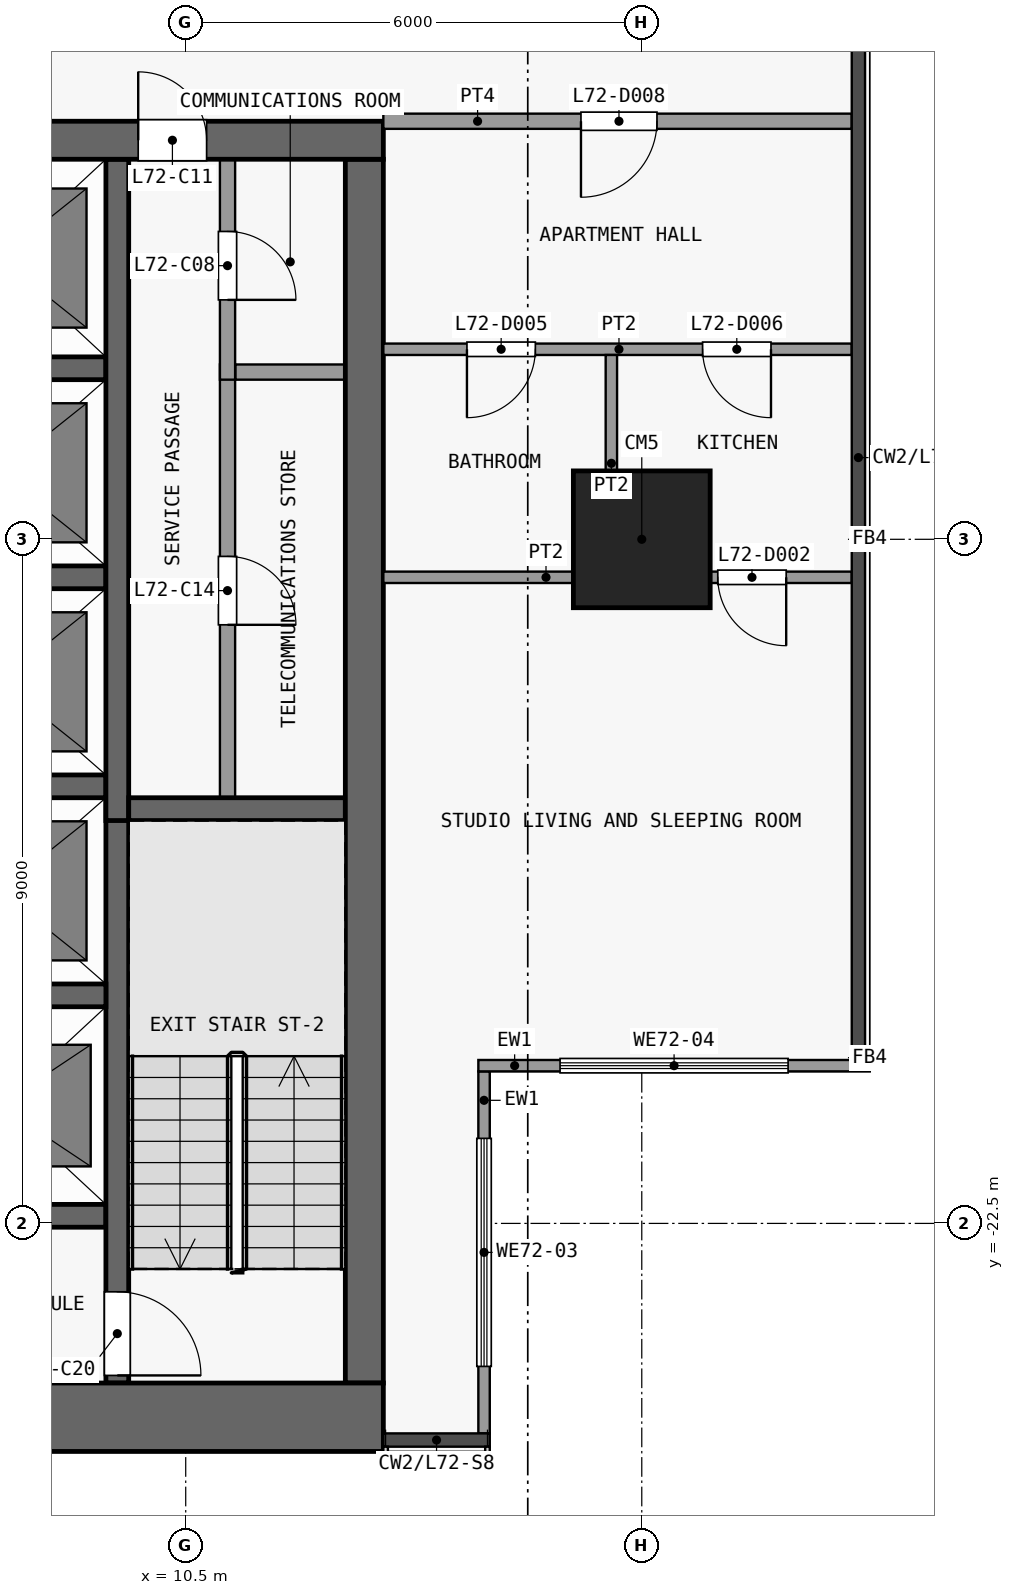
"""IFC4 building model, lengths in metres.
Left out: names, types, materials, properties, quantities, classifications, styles, units other than length and angle.
Written with IfcOpenShell. Run it as: python <this file> out.ifc"""

import sys

from ifc_helpers import new_model, si_unit, direction, frame, frame_2d, origin, origin_2d, place, context, subcontext, project, spatial, rectangle, extrude, element, fill, save


model = new_model("IFC4")
c1 = context("Model", 3, precision=1e-05, world=origin(), true_north=direction((0.0, 1.0)))
c2 = subcontext(c1, "Body", "Model", "MODEL_VIEW")
j1 = project(units=[si_unit("LENGTHUNIT", "METRE"), si_unit("PLANEANGLEUNIT", "RADIAN")], contexts=[c1])
p1 = place(None, origin())
s1 = spatial("IfcSite", under=j1, at=p1, CompositionType="ELEMENT")
p2 = place(p1, origin())
s2 = spatial("IfcBuilding", under=s1, at=p2, CompositionType="ELEMENT")
p3 = place(p2, frame((0.0, 0.0, 284.3)))
s3 = spatial("IfcBuildingStorey", under=s2, at=p3, CompositionType="ELEMENT", Elevation=284.3)
p4 = place(p3, frame((16.5, -13.5, 0.0), z_axis=(0.0, 0.0, 1.0), x_axis=(1.0, 0.0, 0.0)))
e1 = element("IfcColumn", 1, at=p4, inside=s3, PredefinedType="COLUMN", context=c2, shape_type="SweptSolid", body=[
    extrude(rectangle(XDim=1.8, YDim=1.8, at=origin_2d()), origin(), (0.0, 0.0, 1.0), 3.6),
])
p5 = place(p3, frame((-13.1, -25.05, 0.0), z_axis=(0.0, 0.0, 1.0), x_axis=(1.0, 0.0, 0.0)))
e2 = element("IfcWall", 2, at=p5, inside=s3, PredefinedType="SHEAR", context=c2, shape_type="SweptSolid", body=[
    extrude(rectangle(XDim=26.2, YDim=0.9, at=frame_2d((13.1, 0.0))), origin(), (0.0, 0.0, 1.0), 3.3),
])
p6 = place(p3, frame((-13.1, -8.25, 0.0), z_axis=(0.0, 0.0, 1.0), x_axis=(1.0, 0.0, 0.0)))
e3 = element("IfcWall", 3, at=p6, inside=s3, PredefinedType="SHEAR", context=c2, shape_type="SweptSolid", body=[
    extrude(rectangle(XDim=26.2, YDim=0.5, at=frame_2d((13.1, 0.0))), origin(), (0.0, 0.0, 1.0), 3.3),
])
p7 = place(p6, frame((7.4, 0.0, 0.0)))
e4 = element("IfcOpeningElement", 4, at=p7, cuts=e3, PredefinedType="OPENING", context=c2, shape_type="SweptSolid", body=[
    extrude(rectangle(XDim=1.8, YDim=2.1, at=frame_2d((0.9, 1.05))), frame((0.0, 0.26, 0.0), z_axis=(0.0, -1.0, 0.0), x_axis=(1.0, 0.0, 0.0)), (0.0, 0.0, 1.0), 0.52),
])
p8 = place(p6, frame((17.0, 0.0, 0.0)))
e5 = element("IfcOpeningElement", 5, at=p8, cuts=e3, PredefinedType="OPENING", context=c2, shape_type="SweptSolid", body=[
    extrude(rectangle(XDim=1.8, YDim=2.1, at=frame_2d((0.9, 1.05))), frame((0.0, 0.26, 0.0), z_axis=(0.0, -1.0, 0.0), x_axis=(1.0, 0.0, 0.0)), (0.0, 0.0, 1.0), 0.52),
])
p9 = place(p6, frame((2.325, 0.0, 0.0)))
e6 = element("IfcOpeningElement", 6, at=p9, cuts=e3, PredefinedType="OPENING", context=c2, shape_type="SweptSolid", body=[
    extrude(rectangle(XDim=0.9, YDim=2.1, at=frame_2d((0.45, 1.05))), frame((0.0, 0.26, 0.0), z_axis=(0.0, -1.0, 0.0), x_axis=(1.0, 0.0, 0.0)), (0.0, 0.0, 1.0), 0.52),
])
p10 = place(p6, frame((22.975, 0.0, 0.0)))
e7 = element("IfcOpeningElement", 7, at=p10, cuts=e3, PredefinedType="OPENING", context=c2, shape_type="SweptSolid", body=[
    extrude(rectangle(XDim=0.9, YDim=2.1, at=frame_2d((0.45, 1.05))), frame((0.0, 0.26, 0.0), z_axis=(0.0, -1.0, 0.0), x_axis=(1.0, 0.0, 0.0)), (0.0, 0.0, 1.0), 0.52),
])
p11 = place(p3, frame((12.85, -24.6, 0.0), z_axis=(0.0, 0.0, 1.0), x_axis=(0.0, 1.0, 0.0)))
e8 = element("IfcWall", 8, at=p11, inside=s3, PredefinedType="SHEAR", context=c2, shape_type="SweptSolid", body=[
    extrude(rectangle(XDim=16.1, YDim=0.5, at=frame_2d((8.05, 0.0))), origin(), (0.0, 0.0, 1.0), 3.3),
])
for number, where, z_axis, x_axis in (
    (9, (6.65, -22.4, 0.0), (0.0, 0.0, 1.0), (1.0, 0.0, 0.0)),
    (10, (6.65, -19.5, 0.0), (0.0, 0.0, 1.0), (1.0, 0.0, 0.0)),
):
    element("IfcWall", number, at=place(p3, frame(where, z_axis=z_axis, x_axis=x_axis)), inside=s3, PredefinedType="SHEAR", context=c2, shape_type="SweptSolid", body=[
        extrude(rectangle(XDim=2.8, YDim=0.3, at=frame_2d((1.4, 0.0))), origin(), (0.0, 0.0, 1.0), 3.3),
    ])
p12 = place(p3, frame((9.75, -17.05, 0.0), z_axis=(0.0, 0.0, 1.0), x_axis=(1.0, 0.0, 0.0)))
e11 = element("IfcWall", 11, at=p12, inside=s3, PredefinedType="SHEAR", context=c2, shape_type="SweptSolid", body=[
    extrude(rectangle(XDim=2.85, YDim=0.3, at=frame_2d((1.425, 0.0))), origin(), (0.0, 0.0, 1.0), 3.3),
])
for number, where, z_axis, x_axis in (
    (12, (6.65, -16.75, 0.0), (0.0, 0.0, 1.0), (1.0, 0.0, 0.0)),
    (13, (6.65, -14.0, 0.0), (0.0, 0.0, 1.0), (1.0, 0.0, 0.0)),
):
    element("IfcWall", number, at=place(p3, frame(where, z_axis=z_axis, x_axis=x_axis)), inside=s3, PredefinedType="SHEAR", context=c2, shape_type="SweptSolid", body=[
        extrude(rectangle(XDim=2.8, YDim=0.3, at=frame_2d((1.4, 0.0))), origin(), (0.0, 0.0, 1.0), 3.3),
    ])
p13 = place(p3, frame((11.15, -11.3, 0.0), z_axis=(0.0, 0.0, 1.0), x_axis=(1.0, 0.0, 0.0)))
e14 = element("IfcWall", 14, at=p13, inside=s3, PredefinedType="PARTITIONING", context=c2, shape_type="SweptSolid", body=[
    extrude(rectangle(XDim=1.45, YDim=0.2, at=frame_2d((0.725, 0.0))), origin(), (0.0, 0.0, 1.0), 3.3),
])
p14 = place(p3, frame((6.65, -11.25, 0.0), z_axis=(0.0, 0.0, 1.0), x_axis=(1.0, 0.0, 0.0)))
e15 = element("IfcWall", 15, at=p14, inside=s3, PredefinedType="SHEAR", context=c2, shape_type="SweptSolid", body=[
    extrude(rectangle(XDim=2.8, YDim=0.3, at=frame_2d((1.4, 0.0))), origin(), (0.0, 0.0, 1.0), 3.3),
])
p15 = place(p3, frame((9.6, -16.9, 0.0), z_axis=(0.0, 0.0, 1.0), x_axis=(0.0, -1.0, 0.0)))
e16 = element("IfcWall", 16, at=p15, inside=s3, PredefinedType="SHEAR", context=c2, shape_type="SweptSolid", body=[
    extrude(rectangle(XDim=7.7, YDim=0.3, at=frame_2d((3.85, 0.0))), origin(), (0.0, 0.0, 1.0), 3.3),
])
p16 = place(p15, frame((6.5, 0.0, 0.0)))
e17 = element("IfcOpeningElement", 17, at=p16, cuts=e16, PredefinedType="OPENING", context=c2, shape_type="SweptSolid", body=[
    extrude(rectangle(XDim=1.1, YDim=2.1, at=frame_2d((0.55, 1.05))), frame((0.0, 0.16, 0.0), z_axis=(0.0, -1.0, 0.0), x_axis=(1.0, 0.0, 0.0)), (0.0, 0.0, 1.0), 0.32),
])
p17 = place(p3, frame((9.6, -17.2, 0.0), z_axis=(0.0, 0.0, 1.0), x_axis=(0.0, 1.0, 0.0)))
e18 = element("IfcWall", 18, at=p17, inside=s3, PredefinedType="SHEAR", context=c2, shape_type="SweptSolid", body=[
    extrude(rectangle(XDim=8.7, YDim=0.3, at=frame_2d((4.35, 0.0))), origin(), (0.0, 0.0, 1.0), 3.3),
])
p18 = place(p3, frame((11.05, -11.2, 0.0), z_axis=(0.0, 0.0, 1.0), x_axis=(0.0, -1.0, 0.0)))
e19 = element("IfcWall", 19, at=p18, inside=s3, PredefinedType="PARTITIONING", context=c2, shape_type="SweptSolid", body=[
    extrude(rectangle(XDim=5.7, YDim=0.2, at=frame_2d((2.85, 0.0))), origin(), (0.0, 0.0, 1.0), 3.3),
])
p19 = place(p18, frame((2.525, 0.0, 0.0)))
e20 = element("IfcOpeningElement", 20, at=p19, cuts=e19, PredefinedType="OPENING", context=c2, shape_type="SweptSolid", body=[
    extrude(rectangle(XDim=0.9, YDim=2.1, at=frame_2d((0.45, 1.05))), frame((0.0, 0.11, 0.0), z_axis=(0.0, -1.0, 0.0), x_axis=(1.0, 0.0, 0.0)), (0.0, 0.0, 1.0), 0.22),
])
p20 = place(p3, frame((11.05, -8.5, 0.0), z_axis=(0.0, 0.0, 1.0), x_axis=(0.0, -1.0, 0.0)))
e21 = element("IfcWall", 21, at=p20, inside=s3, PredefinedType="PARTITIONING", context=c2, shape_type="SweptSolid", body=[
    extrude(rectangle(XDim=2.9, YDim=0.2, at=frame_2d((1.45, 0.0))), origin(), (0.0, 0.0, 1.0), 3.3),
])
p21 = place(p20, frame((0.95, 0.0, 0.0)))
e22 = element("IfcOpeningElement", 22, at=p21, cuts=e21, PredefinedType="OPENING", context=c2, shape_type="SweptSolid", body=[
    extrude(rectangle(XDim=0.9, YDim=2.1, at=frame_2d((0.45, 1.05))), frame((0.0, 0.11, 0.0), z_axis=(0.0, -1.0, 0.0), x_axis=(1.0, 0.0, 0.0)), (0.0, 0.0, 1.0), 0.22),
])
p22 = place(p3, frame((14.425, -20.5, 0.0), z_axis=(0.0, 0.0, 1.0), x_axis=(0.0, -1.0, 0.0)))
e23 = element("IfcWall", 23, at=p22, inside=s3, PredefinedType="SOLIDWALL", context=c2, shape_type="SweptSolid", body=[
    extrude(rectangle(XDim=4.762, YDim=0.15, at=frame_2d((2.381, 0.0))), origin(), (0.0, 0.0, 1.0), 3.3),
])
p23 = place(p22, frame((0.881, 0.0, 0.9)))
e24 = element("IfcOpeningElement", 24, at=p23, cuts=e23, PredefinedType="OPENING", context=c2, shape_type="SweptSolid", body=[
    extrude(rectangle(XDim=3.0, YDim=2.4, at=frame_2d((1.5, 1.2))), frame((0.0, 0.085, 0.0), z_axis=(0.0, -1.0, 0.0), x_axis=(1.0, 0.0, 0.0)), (0.0, 0.0, 1.0), 0.17),
])
p24 = place(p3, frame((19.5, -20.425, 0.0), z_axis=(0.0, 0.0, 1.0), x_axis=(-1.0, 0.0, 0.0)))
e25 = element("IfcWall", 25, at=p24, inside=s3, PredefinedType="SOLIDWALL", context=c2, shape_type="SweptSolid", body=[
    extrude(rectangle(XDim=5.15, YDim=0.15, at=frame_2d((2.575, 0.0))), origin(), (0.0, 0.0, 1.0), 3.3),
])
p25 = place(p24, frame((1.075, 0.0, 0.9)))
e26 = element("IfcOpeningElement", 26, at=p25, cuts=e25, PredefinedType="OPENING", context=c2, shape_type="SweptSolid", body=[
    extrude(rectangle(XDim=3.0, YDim=2.4, at=frame_2d((1.5, 1.2))), frame((0.0, 0.085, 0.0), z_axis=(0.0, -1.0, 0.0), x_axis=(1.0, 0.0, 0.0)), (0.0, 0.0, 1.0), 0.17),
])
p26 = place(p3, frame((13.1, -14.0, 0.0), z_axis=(0.0, 0.0, 1.0), x_axis=(1.0, 0.0, 0.0)))
e27 = element("IfcWall", 27, at=p26, inside=s3, PredefinedType="PARTITIONING", context=c2, shape_type="SweptSolid", body=[
    extrude(rectangle(XDim=6.162, YDim=0.15, at=frame_2d((3.081, 0.0))), origin(), (0.0, 0.0, 1.0), 3.3),
])
p27 = place(p26, frame((4.4, 0.0, 0.0)))
e28 = element("IfcOpeningElement", 28, at=p27, cuts=e27, PredefinedType="OPENING", context=c2, shape_type="SweptSolid", body=[
    extrude(rectangle(XDim=0.9, YDim=2.1, at=frame_2d((0.45, 1.05))), frame((0.0, 0.085, 0.0), z_axis=(0.0, -1.0, 0.0), x_axis=(1.0, 0.0, 0.0)), (0.0, 0.0, 1.0), 0.17),
])
p28 = place(p3, frame((13.1, -11.0, 0.0), z_axis=(0.0, 0.0, 1.0), x_axis=(1.0, 0.0, 0.0)))
e29 = element("IfcWall", 29, at=p28, inside=s3, PredefinedType="PARTITIONING", context=c2, shape_type="SweptSolid", body=[
    extrude(rectangle(XDim=6.162, YDim=0.15, at=frame_2d((3.081, 0.0))), origin(), (0.0, 0.0, 1.0), 3.3),
])
p29 = place(p28, frame((1.1, 0.0, 0.0)))
e30 = element("IfcOpeningElement", 30, at=p29, cuts=e29, PredefinedType="OPENING", context=c2, shape_type="SweptSolid", body=[
    extrude(rectangle(XDim=0.9, YDim=2.1, at=frame_2d((0.45, 1.05))), frame((0.0, 0.085, 0.0), z_axis=(0.0, -1.0, 0.0), x_axis=(1.0, 0.0, 0.0)), (0.0, 0.0, 1.0), 0.17),
])
p30 = place(p28, frame((4.2, 0.0, 0.0)))
e31 = element("IfcOpeningElement", 31, at=p30, cuts=e29, PredefinedType="OPENING", context=c2, shape_type="SweptSolid", body=[
    extrude(rectangle(XDim=0.9, YDim=2.1, at=frame_2d((0.45, 1.05))), frame((0.0, 0.085, 0.0), z_axis=(0.0, -1.0, 0.0), x_axis=(1.0, 0.0, 0.0)), (0.0, 0.0, 1.0), 0.17),
])
p31 = place(p3, frame((13.1, -8.0, 0.0), z_axis=(0.0, 0.0, 1.0), x_axis=(1.0, 0.0, 0.0)))
e32 = element("IfcWall", 32, at=p31, inside=s3, PredefinedType="PARTITIONING", context=c2, shape_type="SweptSolid", body=[
    extrude(rectangle(XDim=6.162, YDim=0.2, at=frame_2d((3.081, 0.0))), origin(), (0.0, 0.0, 1.0), 3.3),
])
p32 = place(p31, frame((2.6, 0.0, 0.0)))
e33 = element("IfcOpeningElement", 33, at=p32, cuts=e32, PredefinedType="OPENING", context=c2, shape_type="SweptSolid", body=[
    extrude(rectangle(XDim=1.0, YDim=2.1, at=frame_2d((0.5, 1.05))), frame((0.0, 0.11, 0.0), z_axis=(0.0, -1.0, 0.0), x_axis=(1.0, 0.0, 0.0)), (0.0, 0.0, 1.0), 0.22),
])
p33 = place(p3, frame((16.1, -13.925, 0.0), z_axis=(0.0, 0.0, 1.0), x_axis=(0.0, 1.0, 0.0)))
e34 = element("IfcWall", 34, at=p33, inside=s3, PredefinedType="PARTITIONING", context=c2, shape_type="SweptSolid", body=[
    extrude(rectangle(XDim=2.85, YDim=0.15, at=frame_2d((1.425, 0.0))), origin(), (0.0, 0.0, 1.0), 3.3),
])
p34 = place(p21, origin())
e35 = element("IfcDoor", 35, at=p34, inside=s3, OperationType="SINGLE_SWING_RIGHT", PredefinedType="DOOR", context=c2, shape_type="SweptSolid", body=[
    extrude(rectangle(XDim=0.9, YDim=2.1, at=frame_2d((0.45, 1.05))), frame((0.0, 0.025, 0.0), z_axis=(0.0, -1.0, 0.0), x_axis=(1.0, 0.0, 0.0)), (0.0, 0.0, 1.0), 0.05),
])
fill(e22, e35)
p35 = place(p10, origin())
e36 = element("IfcDoor", 36, at=p35, inside=s3, OperationType="SINGLE_SWING_LEFT", PredefinedType="DOOR", context=c2, shape_type="SweptSolid", body=[
    extrude(rectangle(XDim=0.9, YDim=2.1, at=frame_2d((0.45, 1.05))), frame((0.0, 0.025, 0.0), z_axis=(0.0, -1.0, 0.0), x_axis=(1.0, 0.0, 0.0)), (0.0, 0.0, 1.0), 0.05),
])
fill(e7, e36)
p36 = place(p19, origin())
e37 = element("IfcDoor", 37, at=p36, inside=s3, OperationType="SINGLE_SWING_RIGHT", PredefinedType="DOOR", context=c2, shape_type="SweptSolid", body=[
    extrude(rectangle(XDim=0.9, YDim=2.1, at=frame_2d((0.45, 1.05))), frame((0.0, 0.025, 0.0), z_axis=(0.0, -1.0, 0.0), x_axis=(1.0, 0.0, 0.0)), (0.0, 0.0, 1.0), 0.05),
])
fill(e20, e37)
p37 = place(p16, origin())
e38 = element("IfcDoor", 38, at=p37, inside=s3, OperationType="SINGLE_SWING_RIGHT", PredefinedType="DOOR", context=c2, shape_type="SweptSolid", body=[
    extrude(rectangle(XDim=1.1, YDim=2.1, at=frame_2d((0.55, 1.05))), frame((0.0, 0.025, 0.0), z_axis=(0.0, -1.0, 0.0), x_axis=(1.0, 0.0, 0.0)), (0.0, 0.0, 1.0), 0.05),
])
fill(e17, e38)
p38 = place(p23, origin())
e39 = element("IfcWindow", 39, at=p38, inside=s3, PartitioningType="SINGLE_PANEL", PredefinedType="WINDOW", context=c2, shape_type="SweptSolid", body=[
    extrude(rectangle(XDim=3.0, YDim=2.4, at=frame_2d((1.5, 1.2))), frame((0.0, 0.03, 0.0), z_axis=(0.0, -1.0, 0.0), x_axis=(1.0, 0.0, 0.0)), (0.0, 0.0, 1.0), 0.06),
])
fill(e24, e39)
p39 = place(p25, origin())
e40 = element("IfcWindow", 40, at=p39, inside=s3, PartitioningType="SINGLE_PANEL", PredefinedType="WINDOW", context=c2, shape_type="SweptSolid", body=[
    extrude(rectangle(XDim=3.0, YDim=2.4, at=frame_2d((1.5, 1.2))), frame((0.0, 0.03, 0.0), z_axis=(0.0, -1.0, 0.0), x_axis=(1.0, 0.0, 0.0)), (0.0, 0.0, 1.0), 0.06),
])
fill(e26, e40)
p40 = place(p27, origin())
e41 = element("IfcDoor", 41, at=p40, inside=s3, OperationType="SINGLE_SWING_RIGHT", PredefinedType="DOOR", context=c2, shape_type="SweptSolid", body=[
    extrude(rectangle(XDim=0.9, YDim=2.1, at=frame_2d((0.45, 1.05))), frame((0.0, 0.025, 0.0), z_axis=(0.0, -1.0, 0.0), x_axis=(1.0, 0.0, 0.0)), (0.0, 0.0, 1.0), 0.05),
])
fill(e28, e41)
p41 = place(p29, origin())
e42 = element("IfcDoor", 42, at=p41, inside=s3, OperationType="SINGLE_SWING_LEFT", PredefinedType="DOOR", context=c2, shape_type="SweptSolid", body=[
    extrude(rectangle(XDim=0.9, YDim=2.1, at=frame_2d((0.45, 1.05))), frame((0.0, 0.025, 0.0), z_axis=(0.0, -1.0, 0.0), x_axis=(1.0, 0.0, 0.0)), (0.0, 0.0, 1.0), 0.05),
])
fill(e30, e42)
p42 = place(p30, origin())
e43 = element("IfcDoor", 43, at=p42, inside=s3, OperationType="SINGLE_SWING_RIGHT", PredefinedType="DOOR", context=c2, shape_type="SweptSolid", body=[
    extrude(rectangle(XDim=0.9, YDim=2.1, at=frame_2d((0.45, 1.05))), frame((0.0, 0.025, 0.0), z_axis=(0.0, -1.0, 0.0), x_axis=(1.0, 0.0, 0.0)), (0.0, 0.0, 1.0), 0.05),
])
fill(e31, e43)
p43 = place(p32, origin())
e44 = element("IfcDoor", 44, at=p43, inside=s3, OperationType="SINGLE_SWING_LEFT", PredefinedType="DOOR", context=c2, shape_type="SweptSolid", body=[
    extrude(rectangle(XDim=1.0, YDim=2.1, at=frame_2d((0.5, 1.05))), frame((0.0, 0.025, 0.0), z_axis=(0.0, -1.0, 0.0), x_axis=(1.0, 0.0, 0.0)), (0.0, 0.0, 1.0), 0.05),
])
fill(e33, e44)
save(model, sys.argv[1])
